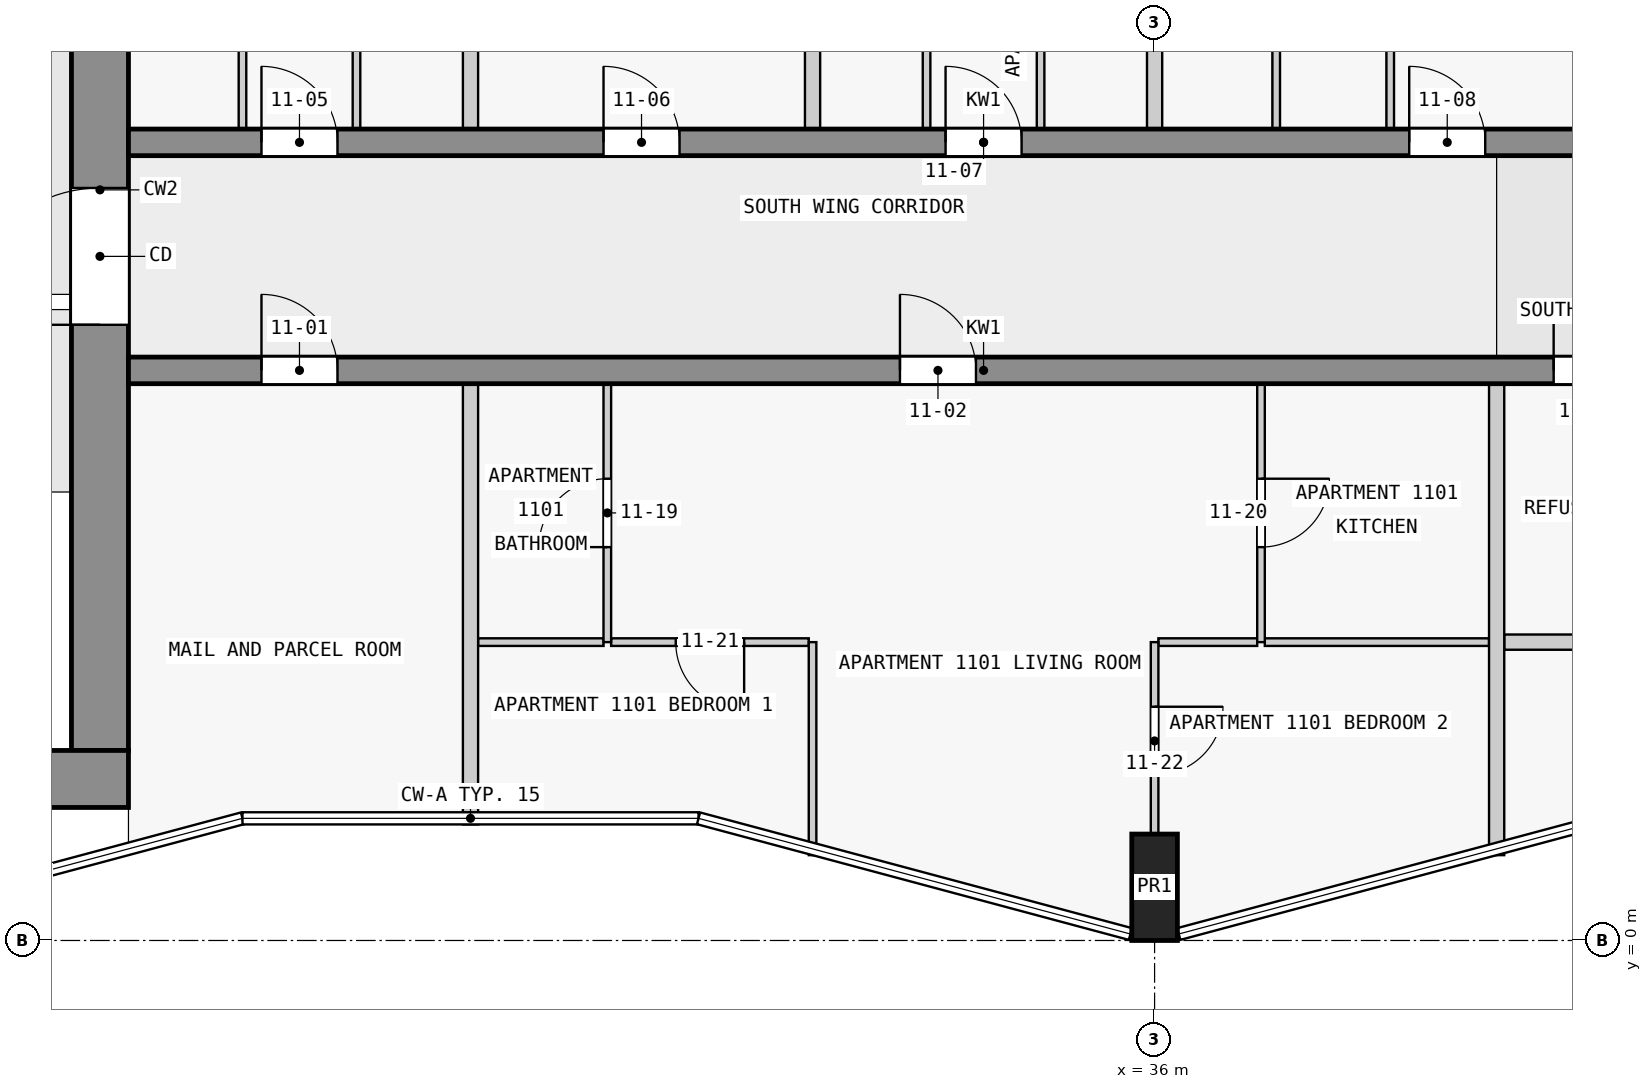
"""IFC4 building model, lengths in metres.
Left out: names, types, materials, properties, quantities, classifications, styles, units other than length and angle.
Written with IfcOpenShell. Run it as: python <this file> out.ifc"""

import sys

from ifc_helpers import new_model, si_unit, direction, frame, frame_2d, origin, origin_2d, place, context, subcontext, project, spatial, rectangle, extrude, element, fill, save


model = new_model("IFC4")
c1 = context("Model", 3, precision=1e-05, world=origin(), true_north=direction((0.0, 1.0)))
c2 = subcontext(c1, "Body", "Model", "MODEL_VIEW")
j1 = project(units=[si_unit("LENGTHUNIT", "METRE"), si_unit("PLANEANGLEUNIT", "RADIAN")], contexts=[c1])
p1 = place(None, origin())
s1 = spatial("IfcSite", under=j1, at=p1, CompositionType="ELEMENT")
p2 = place(p1, origin())
s2 = spatial("IfcBuilding", under=s1, at=p2, CompositionType="ELEMENT")
p3 = place(p2, frame((0.0, 0.0, 47.8)))
s3 = spatial("IfcBuildingStorey", under=s2, at=p3, CompositionType="ELEMENT", Elevation=47.8)
p4 = place(p3, frame((36.0, 0.7, 0.0), z_axis=(0.0, 0.0, 1.0), x_axis=(1.0, 0.0, 0.0)))
e1 = element("IfcColumn", 1, at=p4, inside=s3, PredefinedType="COLUMN", context=c2, shape_type="SweptSolid", body=[
    extrude(rectangle(XDim=0.6, YDim=1.4, at=origin_2d()), origin(), (0.0, 0.0, 1.0), 3.5),
])
p5 = place(p3, frame((1.55, 2.125, 0.0), z_axis=(0.0, 0.0, 1.0), x_axis=(1.0, 0.0, 0.0)))
e2 = element("IfcWall", 2, at=p5, inside=s3, PredefinedType="SHEAR", context=c2, shape_type="SweptSolid", body=[
    extrude(rectangle(XDim=20.95, YDim=0.75, at=frame_2d((10.475, 0.0))), origin(), (0.0, 0.0, 1.0), 3.25),
])
p6 = place(p3, frame((22.125, 2.5, 0.0), z_axis=(0.0, 0.0, 1.0), x_axis=(0.0, 1.0, 0.0)))
e3 = element("IfcWall", 3, at=p6, inside=s3, PredefinedType="SHEAR", context=c2, shape_type="SweptSolid", body=[
    extrude(rectangle(XDim=14.75, YDim=0.75, at=frame_2d((7.375, 0.0))), origin(), (0.0, 0.0, 1.0), 3.25),
])
p7 = place(p6, frame((5.6, 0.0, 0.0)))
e4 = element("IfcOpeningElement", 4, at=p7, cuts=e3, PredefinedType="OPENING", context=c2, shape_type="SweptSolid", body=[
    extrude(rectangle(XDim=1.8, YDim=2.1, at=frame_2d((0.9, 1.05))), frame((0.0, 0.385, 0.0), z_axis=(0.0, -1.0, 0.0), x_axis=(1.0, 0.0, 0.0)), (0.0, 0.0, 1.0), 0.77),
])
p8 = place(p3, frame((22.5, 7.5, 0.0), z_axis=(0.0, 0.0, 1.0), x_axis=(1.0, 0.0, 0.0)))
e5 = element("IfcWall", 5, at=p8, inside=s3, PredefinedType="SHEAR", context=c2, shape_type="SweptSolid", body=[
    extrude(rectangle(XDim=22.5, YDim=0.35, at=frame_2d((11.25, 0.0))), origin(), (0.0, 0.0, 1.0), 3.25),
])
p9 = place(p8, frame((1.75, 0.0, 0.0)))
e6 = element("IfcOpeningElement", 6, at=p9, cuts=e5, PredefinedType="OPENING", context=c2, shape_type="SweptSolid", body=[
    extrude(rectangle(XDim=1.0, YDim=2.1, at=frame_2d((0.5, 1.05))), frame((0.0, 0.185, 0.0), z_axis=(0.0, -1.0, 0.0), x_axis=(1.0, 0.0, 0.0)), (0.0, 0.0, 1.0), 0.37),
])
p10 = place(p8, frame((10.15, 0.0, 0.0)))
e7 = element("IfcOpeningElement", 7, at=p10, cuts=e5, PredefinedType="OPENING", context=c2, shape_type="SweptSolid", body=[
    extrude(rectangle(XDim=1.0, YDim=2.1, at=frame_2d((0.5, 1.05))), frame((0.0, 0.185, 0.0), z_axis=(0.0, -1.0, 0.0), x_axis=(1.0, 0.0, 0.0)), (0.0, 0.0, 1.0), 0.37),
])
p11 = place(p8, frame((18.75, 0.0, 0.0)))
e8 = element("IfcOpeningElement", 8, at=p11, cuts=e5, PredefinedType="OPENING", context=c2, shape_type="SweptSolid", body=[
    extrude(rectangle(XDim=0.9, YDim=2.1, at=frame_2d((0.45, 1.05))), frame((0.0, 0.185, 0.0), z_axis=(0.0, -1.0, 0.0), x_axis=(1.0, 0.0, 0.0)), (0.0, 0.0, 1.0), 0.37),
])
p12 = place(p8, frame((20.95, 0.0, 0.0)))
e9 = element("IfcOpeningElement", 9, at=p12, cuts=e5, PredefinedType="OPENING", context=c2, shape_type="SweptSolid", body=[
    extrude(rectangle(XDim=1.0, YDim=2.1, at=frame_2d((0.5, 1.05))), frame((0.0, 0.185, 0.0), z_axis=(0.0, -1.0, 0.0), x_axis=(1.0, 0.0, 0.0)), (0.0, 0.0, 1.0), 0.37),
])
p13 = place(p3, frame((22.5, 10.5, 0.0), z_axis=(0.0, 0.0, 1.0), x_axis=(1.0, 0.0, 0.0)))
e10 = element("IfcWall", 10, at=p13, inside=s3, PredefinedType="SHEAR", context=c2, shape_type="SweptSolid", body=[
    extrude(rectangle(XDim=22.5, YDim=0.35, at=frame_2d((11.25, 0.0))), origin(), (0.0, 0.0, 1.0), 3.25),
])
p14 = place(p13, frame((1.75, 0.0, 0.0)))
e11 = element("IfcOpeningElement", 11, at=p14, cuts=e10, PredefinedType="OPENING", context=c2, shape_type="SweptSolid", body=[
    extrude(rectangle(XDim=1.0, YDim=2.1, at=frame_2d((0.5, 1.05))), frame((0.0, 0.185, 0.0), z_axis=(0.0, -1.0, 0.0), x_axis=(1.0, 0.0, 0.0)), (0.0, 0.0, 1.0), 0.37),
])
p15 = place(p13, frame((6.25, 0.0, 0.0)))
e12 = element("IfcOpeningElement", 12, at=p15, cuts=e10, PredefinedType="OPENING", context=c2, shape_type="SweptSolid", body=[
    extrude(rectangle(XDim=1.0, YDim=2.1, at=frame_2d((0.5, 1.05))), frame((0.0, 0.185, 0.0), z_axis=(0.0, -1.0, 0.0), x_axis=(1.0, 0.0, 0.0)), (0.0, 0.0, 1.0), 0.37),
])
p16 = place(p13, frame((10.75, 0.0, 0.0)))
e13 = element("IfcOpeningElement", 13, at=p16, cuts=e10, PredefinedType="OPENING", context=c2, shape_type="SweptSolid", body=[
    extrude(rectangle(XDim=1.0, YDim=2.1, at=frame_2d((0.5, 1.05))), frame((0.0, 0.185, 0.0), z_axis=(0.0, -1.0, 0.0), x_axis=(1.0, 0.0, 0.0)), (0.0, 0.0, 1.0), 0.37),
])
p17 = place(p13, frame((16.85, 0.0, 0.0)))
e14 = element("IfcOpeningElement", 14, at=p17, cuts=e10, PredefinedType="OPENING", context=c2, shape_type="SweptSolid", body=[
    extrude(rectangle(XDim=1.0, YDim=2.1, at=frame_2d((0.5, 1.05))), frame((0.0, 0.185, 0.0), z_axis=(0.0, -1.0, 0.0), x_axis=(1.0, 0.0, 0.0)), (0.0, 0.0, 1.0), 0.37),
])
p18 = place(p3, frame((31.45, 3.925, 0.0), z_axis=(0.0, 0.0, 1.0), x_axis=(-1.0, 0.0, 0.0)))
e15 = element("IfcWall", 15, at=p18, inside=s3, PredefinedType="PARTITIONING", context=c2, shape_type="SweptSolid", body=[
    extrude(rectangle(XDim=2.6, YDim=0.1, at=frame_2d((1.3, 0.0))), origin(), (0.0, 0.0, 1.0), 3.25),
])
p19 = place(p18, frame((0.85, 0.0, 0.0)))
e16 = element("IfcOpeningElement", 16, at=p19, cuts=e15, PredefinedType="OPENING", context=c2, shape_type="SweptSolid", body=[
    extrude(rectangle(XDim=0.9, YDim=2.1, at=frame_2d((0.45, 1.05))), frame((0.0, 0.06, 0.0), z_axis=(0.0, -1.0, 0.0), x_axis=(1.0, 0.0, 0.0)), (0.0, 0.0, 1.0), 0.12),
])
p20 = place(p3, frame((37.35, 3.925, 0.0), z_axis=(0.0, 0.0, 1.0), x_axis=(-1.0, 0.0, 0.0)))
e17 = element("IfcWall", 17, at=p20, inside=s3, PredefinedType="PARTITIONING", context=c2, shape_type="SweptSolid", body=[
    extrude(rectangle(XDim=1.3, YDim=0.1, at=frame_2d((0.65, 0.0))), origin(), (0.0, 0.0, 1.0), 3.25),
])
p21 = place(p3, frame((27.1, 3.925, 0.0), z_axis=(0.0, 0.0, 1.0), x_axis=(1.0, 0.0, 0.0)))
e18 = element("IfcWall", 18, at=p21, inside=s3, PredefinedType="PARTITIONING", context=c2, shape_type="SweptSolid", body=[
    extrude(rectangle(XDim=1.65, YDim=0.1, at=frame_2d((0.825, 0.0))), origin(), (0.0, 0.0, 1.0), 3.25),
])
p22 = place(p3, frame((37.45, 3.925, 0.0), z_axis=(0.0, 0.0, 1.0), x_axis=(1.0, 0.0, 0.0)))
e19 = element("IfcWall", 19, at=p22, inside=s3, PredefinedType="PARTITIONING", context=c2, shape_type="SweptSolid", body=[
    extrude(rectangle(XDim=2.95, YDim=0.1, at=frame_2d((1.475, 0.0))), origin(), (0.0, 0.0, 1.0), 3.25),
])
p23 = place(p3, frame((40.6, 3.925, 0.0), z_axis=(0.0, 0.0, 1.0), x_axis=(1.0, 0.0, 0.0)))
e20 = element("IfcWall", 20, at=p23, inside=s3, PredefinedType="PARTITIONING", context=c2, shape_type="SweptSolid", body=[
    extrude(rectangle(XDim=2.2, YDim=0.2, at=frame_2d((1.1, 0.0))), origin(), (0.0, 0.0, 1.0), 3.25),
])
p24 = place(p3, frame((24.0, 10.675, 0.0), z_axis=(0.0, 0.0, 1.0), x_axis=(0.0, 1.0, 0.0)))
e21 = element("IfcWall", 21, at=p24, inside=s3, PredefinedType="PARTITIONING", context=c2, shape_type="SweptSolid", body=[
    extrude(rectangle(XDim=3.4, YDim=0.1, at=frame_2d((1.7, 0.0))), origin(), (0.0, 0.0, 1.0), 3.25),
])
p25 = place(p24, frame((1.25, 0.0, 0.0)))
e22 = element("IfcOpeningElement", 22, at=p25, cuts=e21, PredefinedType="OPENING", context=c2, shape_type="SweptSolid", body=[
    extrude(rectangle(XDim=0.9, YDim=2.1, at=frame_2d((0.45, 1.05))), frame((0.0, 0.06, 0.0), z_axis=(0.0, -1.0, 0.0), x_axis=(1.0, 0.0, 0.0)), (0.0, 0.0, 1.0), 0.12),
])
p26 = place(p3, frame((25.5, 14.075, 0.0), z_axis=(0.0, 0.0, 1.0), x_axis=(0.0, -1.0, 0.0)))
e23 = element("IfcWall", 23, at=p26, inside=s3, PredefinedType="PARTITIONING", context=c2, shape_type="SweptSolid", body=[
    extrude(rectangle(XDim=3.4, YDim=0.1, at=frame_2d((1.7, 0.0))), origin(), (0.0, 0.0, 1.0), 3.25),
])
p27 = place(p26, frame((1.25, 0.0, 0.0)))
e24 = element("IfcOpeningElement", 24, at=p27, cuts=e23, PredefinedType="OPENING", context=c2, shape_type="SweptSolid", body=[
    extrude(rectangle(XDim=0.9, YDim=2.1, at=frame_2d((0.45, 1.05))), frame((0.0, 0.06, 0.0), z_axis=(0.0, -1.0, 0.0), x_axis=(1.0, 0.0, 0.0)), (0.0, 0.0, 1.0), 0.12),
])
p28 = place(p3, frame((27.0, 1.527, 0.0), z_axis=(0.0, 0.0, 1.0), x_axis=(0.0, 1.0, 0.0)))
e25 = element("IfcWall", 25, at=p28, inside=s3, PredefinedType="PARTITIONING", context=c2, shape_type="SweptSolid", body=[
    extrude(rectangle(XDim=5.798, YDim=0.2, at=frame_2d((2.899, 0.0))), origin(), (0.0, 0.0, 1.0), 3.25),
])
p29 = place(p3, frame((27.0, 10.675, 0.0), z_axis=(0.0, 0.0, 1.0), x_axis=(0.0, 1.0, 0.0)))
e26 = element("IfcWall", 26, at=p29, inside=s3, PredefinedType="PARTITIONING", context=c2, shape_type="SweptSolid", body=[
    extrude(rectangle(XDim=3.4, YDim=0.2, at=frame_2d((1.7, 0.0))), origin(), (0.0, 0.0, 1.0), 3.25),
])
p30 = place(p3, frame((28.8, 3.925, 0.0), z_axis=(0.0, 0.0, 1.0), x_axis=(0.0, 1.0, 0.0)))
e27 = element("IfcWall", 27, at=p30, inside=s3, PredefinedType="PARTITIONING", context=c2, shape_type="SweptSolid", body=[
    extrude(rectangle(XDim=3.4, YDim=0.1, at=frame_2d((1.7, 0.0))), origin(), (0.0, 0.0, 1.0), 3.25),
])
p31 = place(p30, frame((1.25, 0.0, 0.0)))
e28 = element("IfcOpeningElement", 28, at=p31, cuts=e27, PredefinedType="OPENING", context=c2, shape_type="SweptSolid", body=[
    extrude(rectangle(XDim=0.9, YDim=2.1, at=frame_2d((0.45, 1.05))), frame((0.0, 0.06, 0.0), z_axis=(0.0, -1.0, 0.0), x_axis=(1.0, 0.0, 0.0)), (0.0, 0.0, 1.0), 0.12),
])
p32 = place(p3, frame((31.5, 1.122, 0.0), z_axis=(0.0, 0.0, 1.0), x_axis=(0.0, 1.0, 0.0)))
e29 = element("IfcWall", 29, at=p32, inside=s3, PredefinedType="PARTITIONING", context=c2, shape_type="SweptSolid", body=[
    extrude(rectangle(XDim=2.803, YDim=0.1, at=frame_2d((1.401, 0.0))), origin(), (0.0, 0.0, 1.0), 3.25),
])
p33 = place(p3, frame((31.5, 10.675, 0.0), z_axis=(0.0, 0.0, 1.0), x_axis=(0.0, 1.0, 0.0)))
e30 = element("IfcWall", 30, at=p33, inside=s3, PredefinedType="PARTITIONING", context=c2, shape_type="SweptSolid", body=[
    extrude(rectangle(XDim=6.203, YDim=0.2, at=frame_2d((3.101, 0.0))), origin(), (0.0, 0.0, 1.0), 3.25),
])
p34 = place(p3, frame((33.0, 10.675, 0.0), z_axis=(0.0, 0.0, 1.0), x_axis=(0.0, 1.0, 0.0)))
e31 = element("IfcWall", 31, at=p34, inside=s3, PredefinedType="PARTITIONING", context=c2, shape_type="SweptSolid", body=[
    extrude(rectangle(XDim=3.4, YDim=0.1, at=frame_2d((1.7, 0.0))), origin(), (0.0, 0.0, 1.0), 3.25),
])
p35 = place(p34, frame((1.25, 0.0, 0.0)))
e32 = element("IfcOpeningElement", 32, at=p35, cuts=e31, PredefinedType="OPENING", context=c2, shape_type="SweptSolid", body=[
    extrude(rectangle(XDim=0.9, YDim=2.1, at=frame_2d((0.45, 1.05))), frame((0.0, 0.06, 0.0), z_axis=(0.0, -1.0, 0.0), x_axis=(1.0, 0.0, 0.0)), (0.0, 0.0, 1.0), 0.12),
])
p36 = place(p3, frame((34.5, 14.025, 0.0), z_axis=(0.0, 0.0, 1.0), x_axis=(0.0, -1.0, 0.0)))
e33 = element("IfcWall", 33, at=p36, inside=s3, PredefinedType="PARTITIONING", context=c2, shape_type="SweptSolid", body=[
    extrude(rectangle(XDim=3.35, YDim=0.1, at=frame_2d((1.675, 0.0))), origin(), (0.0, 0.0, 1.0), 3.25),
])
p37 = place(p36, frame((1.25, 0.0, 0.0)))
e34 = element("IfcOpeningElement", 34, at=p37, cuts=e33, PredefinedType="OPENING", context=c2, shape_type="SweptSolid", body=[
    extrude(rectangle(XDim=0.9, YDim=2.1, at=frame_2d((0.45, 1.05))), frame((0.0, 0.06, 0.0), z_axis=(0.0, -1.0, 0.0), x_axis=(1.0, 0.0, 0.0)), (0.0, 0.0, 1.0), 0.12),
])
p38 = place(p3, frame((36.0, 3.925, 0.0), z_axis=(0.0, 0.0, 1.0), x_axis=(0.0, -1.0, 0.0)))
e35 = element("IfcWall", 35, at=p38, inside=s3, PredefinedType="PARTITIONING", context=c2, shape_type="SweptSolid", body=[
    extrude(rectangle(XDim=2.525, YDim=0.1, at=frame_2d((1.263, 0.0))), origin(), (0.0, 0.0, 1.0), 3.25),
])
p39 = place(p38, frame((0.85, 0.0, 0.0)))
e36 = element("IfcOpeningElement", 36, at=p39, cuts=e35, PredefinedType="OPENING", context=c2, shape_type="SweptSolid", body=[
    extrude(rectangle(XDim=0.9, YDim=2.1, at=frame_2d((0.45, 1.05))), frame((0.0, 0.06, 0.0), z_axis=(0.0, -1.0, 0.0), x_axis=(1.0, 0.0, 0.0)), (0.0, 0.0, 1.0), 0.12),
])
p40 = place(p3, frame((36.0, 10.675, 0.0), z_axis=(0.0, 0.0, 1.0), x_axis=(0.0, 1.0, 0.0)))
e37 = element("IfcWall", 37, at=p40, inside=s3, PredefinedType="PARTITIONING", context=c2, shape_type="SweptSolid", body=[
    extrude(rectangle(XDim=3.4, YDim=0.2, at=frame_2d((1.7, 0.0))), origin(), (0.0, 0.0, 1.0), 3.25),
])
p41 = place(p3, frame((37.4, 7.325, 0.0), z_axis=(0.0, 0.0, 1.0), x_axis=(0.0, -1.0, 0.0)))
e38 = element("IfcWall", 38, at=p41, inside=s3, PredefinedType="PARTITIONING", context=c2, shape_type="SweptSolid", body=[
    extrude(rectangle(XDim=3.4, YDim=0.1, at=frame_2d((1.7, 0.0))), origin(), (0.0, 0.0, 1.0), 3.25),
])
p42 = place(p41, frame((1.25, 0.0, 0.0)))
e39 = element("IfcOpeningElement", 39, at=p42, cuts=e38, PredefinedType="OPENING", context=c2, shape_type="SweptSolid", body=[
    extrude(rectangle(XDim=0.9, YDim=2.1, at=frame_2d((0.45, 1.05))), frame((0.0, 0.06, 0.0), z_axis=(0.0, -1.0, 0.0), x_axis=(1.0, 0.0, 0.0)), (0.0, 0.0, 1.0), 0.12),
])
p43 = place(p3, frame((37.6, 10.675, 0.0), z_axis=(0.0, 0.0, 1.0), x_axis=(0.0, 1.0, 0.0)))
e40 = element("IfcWall", 40, at=p43, inside=s3, PredefinedType="PARTITIONING", context=c2, shape_type="SweptSolid", body=[
    extrude(rectangle(XDim=3.35, YDim=0.1, at=frame_2d((1.675, 0.0))), origin(), (0.0, 0.0, 1.0), 3.25),
])
p44 = place(p3, frame((39.1, 10.675, 0.0), z_axis=(0.0, 0.0, 1.0), x_axis=(0.0, 1.0, 0.0)))
e41 = element("IfcWall", 41, at=p44, inside=s3, PredefinedType="PARTITIONING", context=c2, shape_type="SweptSolid", body=[
    extrude(rectangle(XDim=3.35, YDim=0.1, at=frame_2d((1.675, 0.0))), origin(), (0.0, 0.0, 1.0), 3.25),
])
p45 = place(p44, frame((1.25, 0.0, 0.0)))
e42 = element("IfcOpeningElement", 42, at=p45, cuts=e41, PredefinedType="OPENING", context=c2, shape_type="SweptSolid", body=[
    extrude(rectangle(XDim=0.9, YDim=2.1, at=frame_2d((0.45, 1.05))), frame((0.0, 0.06, 0.0), z_axis=(0.0, -1.0, 0.0), x_axis=(1.0, 0.0, 0.0)), (0.0, 0.0, 1.0), 0.12),
])
p46 = place(p3, frame((40.5, 1.122, 0.0), z_axis=(0.0, 0.0, 1.0), x_axis=(0.0, 1.0, 0.0)))
e43 = element("IfcWall", 43, at=p46, inside=s3, PredefinedType="PARTITIONING", context=c2, shape_type="SweptSolid", body=[
    extrude(rectangle(XDim=6.203, YDim=0.2, at=frame_2d((3.101, 0.0))), origin(), (0.0, 0.0, 1.0), 3.25),
])
p47 = place(p7, origin())
e44 = element("IfcDoor", 44, at=p47, inside=s3, OperationType="DOUBLE_DOOR_SINGLE_SWING", PredefinedType="DOOR", context=c2, shape_type="SweptSolid", body=[
    extrude(rectangle(XDim=1.8, YDim=2.1, at=frame_2d((0.9, 1.05))), frame((0.0, 0.025, 0.0), z_axis=(0.0, -1.0, 0.0), x_axis=(1.0, 0.0, 0.0)), (0.0, 0.0, 1.0), 0.05),
])
fill(e4, e44)
p48 = place(p9, origin())
e45 = element("IfcDoor", 45, at=p48, inside=s3, OperationType="SINGLE_SWING_LEFT", PredefinedType="DOOR", context=c2, shape_type="SweptSolid", body=[
    extrude(rectangle(XDim=1.0, YDim=2.1, at=frame_2d((0.5, 1.05))), frame((0.0, 0.025, 0.0), z_axis=(0.0, -1.0, 0.0), x_axis=(1.0, 0.0, 0.0)), (0.0, 0.0, 1.0), 0.05),
])
fill(e6, e45)
p49 = place(p10, origin())
e46 = element("IfcDoor", 46, at=p49, inside=s3, OperationType="SINGLE_SWING_LEFT", PredefinedType="DOOR", context=c2, shape_type="SweptSolid", body=[
    extrude(rectangle(XDim=1.0, YDim=2.1, at=frame_2d((0.5, 1.05))), frame((0.0, 0.025, 0.0), z_axis=(0.0, -1.0, 0.0), x_axis=(1.0, 0.0, 0.0)), (0.0, 0.0, 1.0), 0.05),
])
fill(e7, e46)
p50 = place(p11, origin())
e47 = element("IfcDoor", 47, at=p50, inside=s3, OperationType="SINGLE_SWING_RIGHT", PredefinedType="DOOR", context=c2, shape_type="SweptSolid", body=[
    extrude(rectangle(XDim=0.9, YDim=2.1, at=frame_2d((0.45, 1.05))), frame((0.0, 0.025, 0.0), z_axis=(0.0, -1.0, 0.0), x_axis=(1.0, 0.0, 0.0)), (0.0, 0.0, 1.0), 0.05),
])
fill(e8, e47)
p51 = place(p14, origin())
e48 = element("IfcDoor", 48, at=p51, inside=s3, OperationType="SINGLE_SWING_LEFT", PredefinedType="DOOR", context=c2, shape_type="SweptSolid", body=[
    extrude(rectangle(XDim=1.0, YDim=2.1, at=frame_2d((0.5, 1.05))), frame((0.0, 0.025, 0.0), z_axis=(0.0, -1.0, 0.0), x_axis=(1.0, 0.0, 0.0)), (0.0, 0.0, 1.0), 0.05),
])
fill(e11, e48)
p52 = place(p15, origin())
e49 = element("IfcDoor", 49, at=p52, inside=s3, OperationType="SINGLE_SWING_LEFT", PredefinedType="DOOR", context=c2, shape_type="SweptSolid", body=[
    extrude(rectangle(XDim=1.0, YDim=2.1, at=frame_2d((0.5, 1.05))), frame((0.0, 0.025, 0.0), z_axis=(0.0, -1.0, 0.0), x_axis=(1.0, 0.0, 0.0)), (0.0, 0.0, 1.0), 0.05),
])
fill(e12, e49)
p53 = place(p16, origin())
e50 = element("IfcDoor", 50, at=p53, inside=s3, OperationType="SINGLE_SWING_LEFT", PredefinedType="DOOR", context=c2, shape_type="SweptSolid", body=[
    extrude(rectangle(XDim=1.0, YDim=2.1, at=frame_2d((0.5, 1.05))), frame((0.0, 0.025, 0.0), z_axis=(0.0, -1.0, 0.0), x_axis=(1.0, 0.0, 0.0)), (0.0, 0.0, 1.0), 0.05),
])
fill(e13, e50)
p54 = place(p17, origin())
e51 = element("IfcDoor", 51, at=p54, inside=s3, OperationType="SINGLE_SWING_RIGHT", PredefinedType="DOOR", context=c2, shape_type="SweptSolid", body=[
    extrude(rectangle(XDim=1.0, YDim=2.1, at=frame_2d((0.5, 1.05))), frame((0.0, 0.025, 0.0), z_axis=(0.0, -1.0, 0.0), x_axis=(1.0, 0.0, 0.0)), (0.0, 0.0, 1.0), 0.05),
])
fill(e14, e51)
p55 = place(p31, origin())
e52 = element("IfcDoor", 52, at=p55, inside=s3, OperationType="SINGLE_SWING_LEFT", PredefinedType="DOOR", context=c2, shape_type="SweptSolid", body=[
    extrude(rectangle(XDim=0.9, YDim=2.1, at=frame_2d((0.45, 1.05))), frame((0.0, 0.025, 0.0), z_axis=(0.0, -1.0, 0.0), x_axis=(1.0, 0.0, 0.0)), (0.0, 0.0, 1.0), 0.05),
])
fill(e28, e52)
p56 = place(p42, origin())
e53 = element("IfcDoor", 53, at=p56, inside=s3, OperationType="SINGLE_SWING_LEFT", PredefinedType="DOOR", context=c2, shape_type="SweptSolid", body=[
    extrude(rectangle(XDim=0.9, YDim=2.1, at=frame_2d((0.45, 1.05))), frame((0.0, 0.025, 0.0), z_axis=(0.0, -1.0, 0.0), x_axis=(1.0, 0.0, 0.0)), (0.0, 0.0, 1.0), 0.05),
])
fill(e39, e53)
p57 = place(p19, origin())
e54 = element("IfcDoor", 54, at=p57, inside=s3, OperationType="SINGLE_SWING_RIGHT", PredefinedType="DOOR", context=c2, shape_type="SweptSolid", body=[
    extrude(rectangle(XDim=0.9, YDim=2.1, at=frame_2d((0.45, 1.05))), frame((0.0, 0.025, 0.0), z_axis=(0.0, -1.0, 0.0), x_axis=(1.0, 0.0, 0.0)), (0.0, 0.0, 1.0), 0.05),
])
fill(e16, e54)
p58 = place(p39, origin())
e55 = element("IfcDoor", 55, at=p58, inside=s3, OperationType="SINGLE_SWING_RIGHT", PredefinedType="DOOR", context=c2, shape_type="SweptSolid", body=[
    extrude(rectangle(XDim=0.9, YDim=2.1, at=frame_2d((0.45, 1.05))), frame((0.0, 0.025, 0.0), z_axis=(0.0, -1.0, 0.0), x_axis=(1.0, 0.0, 0.0)), (0.0, 0.0, 1.0), 0.05),
])
fill(e36, e55)
save(model, sys.argv[1])
